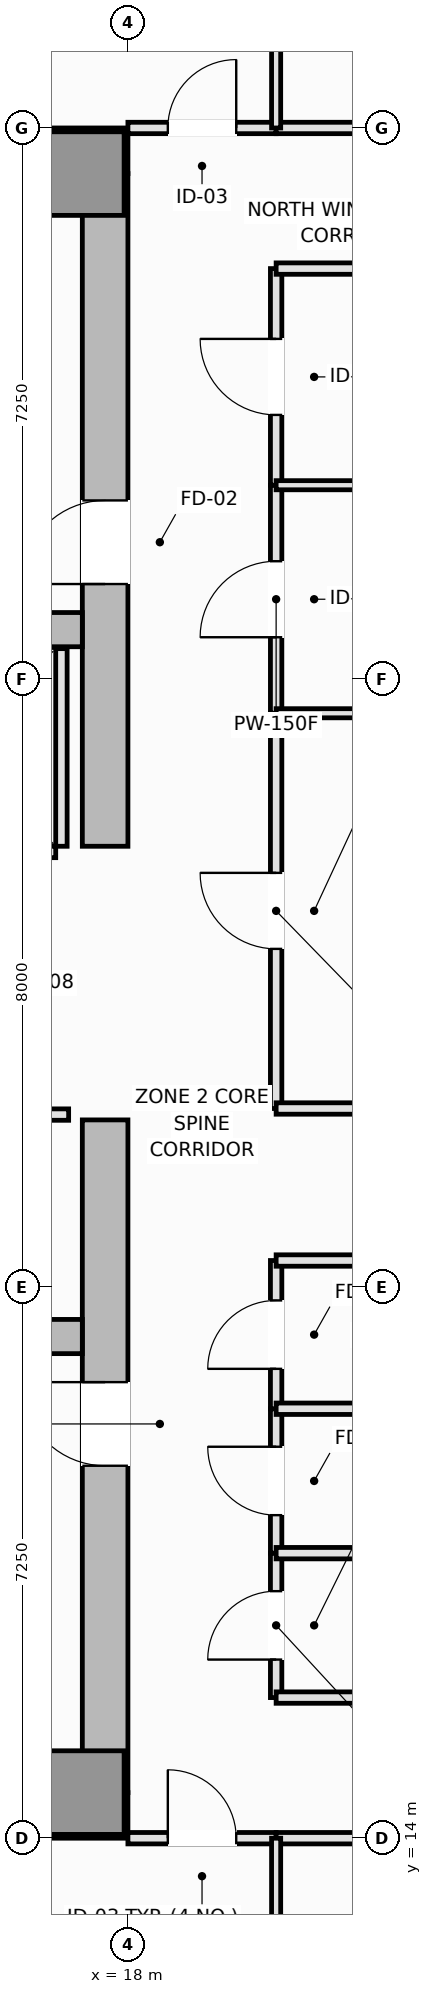
"""IFC4 building model, lengths in metres.
Left out: names, types, materials, properties, quantities, classifications, styles, units other than length and angle.
Written with IfcOpenShell. Run it as: python <this file> out.ifc"""

import sys

from ifc_helpers import new_model, si_unit, direction, frame, frame_2d, origin, origin_2d, place, context, subcontext, project, spatial, rectangle, extrude, element, fill, save


model = new_model("IFC4")
c1 = context("Model", 3, precision=1e-05, world=origin(), true_north=direction((0.0, 1.0)))
c2 = subcontext(c1, "Body", "Model", "MODEL_VIEW")
j1 = project(units=[si_unit("LENGTHUNIT", "METRE"), si_unit("PLANEANGLEUNIT", "RADIAN")], contexts=[c1])
p1 = place(None, origin())
s1 = spatial("IfcSite", under=j1, at=p1, CompositionType="ELEMENT")
p2 = place(p1, origin())
s2 = spatial("IfcBuilding", under=s1, at=p2, CompositionType="ELEMENT")
p3 = place(p2, frame((0.0, 0.0, 166.15)))
s3 = spatial("IfcBuildingStorey", under=s2, at=p3, CompositionType="ELEMENT", Elevation=166.15)
for number, where, z_axis, x_axis in (
    (1, (4.5, 14.3, 0.0), (0.0, 0.0, 1.0), (1.0, 0.0, 0.0)),
    (2, (4.5, 36.2, 0.0), (0.0, 0.0, 1.0), (1.0, 0.0, 0.0)),
):
    element("IfcWall", number, at=place(p3, frame(where, z_axis=z_axis, x_axis=x_axis)), inside=s3, PredefinedType="SHEAR", context=c2, shape_type="SweptSolid", body=[
        extrude(rectangle(XDim=13.5, YDim=0.6, at=frame_2d((6.75, 0.0))), origin(), (0.0, 0.0, 1.0), 3.55),
    ])
p4 = place(p3, frame((17.7, 14.6, 0.0), z_axis=(0.0, 0.0, 1.0), x_axis=(0.0, 1.0, 0.0)))
e3 = element("IfcWall", 3, at=p4, inside=s3, PredefinedType="SHEAR", context=c2, shape_type="SweptSolid", body=[
    extrude(rectangle(XDim=8.85, YDim=0.6, at=frame_2d((4.425, 0.0))), origin(), (0.0, 0.0, 1.0), 3.55),
])
p5 = place(p4, frame((4.3, 0.0, 0.0)))
e4 = element("IfcOpeningElement", 4, at=p5, cuts=e3, PredefinedType="OPENING", context=c2, shape_type="SweptSolid", body=[
    extrude(rectangle(XDim=1.1, YDim=2.15, at=frame_2d((0.55, 1.075))), frame((0.0, 0.31, 0.0), z_axis=(0.0, -1.0, 0.0), x_axis=(1.0, 0.0, 0.0)), (0.0, 0.0, 1.0), 0.62),
])
p6 = place(p3, frame((17.7, 27.05, 0.0), z_axis=(0.0, 0.0, 1.0), x_axis=(0.0, 1.0, 0.0)))
e5 = element("IfcWall", 5, at=p6, inside=s3, PredefinedType="SHEAR", context=c2, shape_type="SweptSolid", body=[
    extrude(rectangle(XDim=8.85, YDim=0.6, at=frame_2d((4.425, 0.0))), origin(), (0.0, 0.0, 1.0), 3.55),
])
p7 = place(p6, frame((3.45, 0.0, 0.0)))
e6 = element("IfcOpeningElement", 6, at=p7, cuts=e5, PredefinedType="OPENING", context=c2, shape_type="SweptSolid", body=[
    extrude(rectangle(XDim=1.1, YDim=2.15, at=frame_2d((0.55, 1.075))), frame((0.0, 0.31, 0.0), z_axis=(0.0, -1.0, 0.0), x_axis=(1.0, 0.0, 0.0)), (0.0, 0.0, 1.0), 0.62),
])
for number, where, z_axis, x_axis in (
    (7, (5.1, 20.6, 0.0), (0.0, 0.0, 1.0), (1.0, 0.0, 0.0)),
    (8, (5.1, 29.9, 0.0), (0.0, 0.0, 1.0), (1.0, 0.0, 0.0)),
):
    element("IfcWall", number, at=place(p3, frame(where, z_axis=z_axis, x_axis=x_axis)), inside=s3, PredefinedType="SHEAR", context=c2, shape_type="SweptSolid", body=[
        extrude(rectangle(XDim=12.3, YDim=0.45, at=frame_2d((6.15, 0.0))), origin(), (0.0, 0.0, 1.0), 3.55),
    ])
for number, where, z_axis, x_axis in (
    (9, (17.4, 14.6, 0.0), (0.0, 0.0, 1.0), (1.0, 0.0, 0.0)),
    (10, (17.4, 35.9, 0.0), (0.0, 0.0, 1.0), (1.0, 0.0, 0.0)),
):
    element("IfcColumn", number, at=place(p3, frame(where, z_axis=z_axis, x_axis=x_axis)), inside=s3, PredefinedType="PILASTER", context=c2, shape_type="SweptSolid", body=[
        extrude(rectangle(XDim=1.1, YDim=1.1, at=origin_2d()), origin(), (0.0, 0.0, 1.0), 3.55),
    ])
p8 = place(p3, frame((14.5, 26.975, 0.0), z_axis=(0.0, 0.0, 1.0), x_axis=(1.0, 0.0, 0.0)))
e11 = element("IfcWall", 11, at=p8, inside=s3, PredefinedType="PARTITIONING", context=c2, shape_type="SweptSolid", body=[
    extrude(rectangle(XDim=2.55, YDim=0.15, at=frame_2d((1.275, 0.0))), origin(), (0.0, 0.0, 1.0), 3.37),
])
p9 = place(p8, frame((0.625, 0.0, 0.0)))
e12 = element("IfcOpeningElement", 12, at=p9, cuts=e11, PredefinedType="OPENING", context=c2, shape_type="SweptSolid", body=[
    extrude(rectangle(XDim=1.3, YDim=2.2, at=frame_2d((0.65, 1.1))), frame((0.0, 0.085, 0.0), z_axis=(0.0, -1.0, 0.0), x_axis=(1.0, 0.0, 0.0)), (0.0, 0.0, 1.0), 0.17),
])
p10 = place(p3, frame((17.125, 27.05, 0.0), z_axis=(0.0, 0.0, 1.0), x_axis=(0.0, 1.0, 0.0)))
e13 = element("IfcWall", 13, at=p10, inside=s3, PredefinedType="PARTITIONING", context=c2, shape_type="SweptSolid", body=[
    extrude(rectangle(XDim=2.6, YDim=0.15, at=frame_2d((1.3, 0.0))), origin(), (0.0, 0.0, 1.0), 3.37),
])
p11 = place(p3, frame((16.05, 23.52, 0.0), z_axis=(0.0, 0.0, 1.0), x_axis=(1.0, 0.0, 0.0)))
e14 = element("IfcWall", 14, at=p11, inside=s3, PredefinedType="PARTITIONING", context=c2, shape_type="SweptSolid", body=[
    extrude(rectangle(XDim=1.17, YDim=0.15, at=frame_2d((0.585, 0.0))), origin(), (0.0, 0.0, 1.0), 3.37),
])
p12 = place(p3, frame((19.95, 15.85, 0.0), z_axis=(0.0, 0.0, 1.0), x_axis=(0.0, 1.0, 0.0)))
e15 = element("IfcWall", 15, at=p12, inside=s3, PredefinedType="PLUMBINGWALL", context=c2, shape_type="SweptSolid", body=[
    extrude(rectangle(XDim=1.9, YDim=0.15, at=frame_2d((0.95, 0.0))), origin(), (0.0, 0.0, 1.0), 3.37),
])
p13 = place(p12, frame((0.5, 0.0, 0.0)))
e16 = element("IfcOpeningElement", 16, at=p13, cuts=e15, PredefinedType="OPENING", context=c2, shape_type="SweptSolid", body=[
    extrude(rectangle(XDim=0.9, YDim=2.1, at=frame_2d((0.45, 1.05))), frame((0.0, 0.085, 0.0), z_axis=(0.0, -1.0, 0.0), x_axis=(1.0, 0.0, 0.0)), (0.0, 0.0, 1.0), 0.17),
])
p14 = place(p3, frame((19.95, 17.75, 0.0), z_axis=(0.0, 0.0, 1.0), x_axis=(0.0, 1.0, 0.0)))
e17 = element("IfcWall", 17, at=p14, inside=s3, PredefinedType="PLUMBINGWALL", context=c2, shape_type="SweptSolid", body=[
    extrude(rectangle(XDim=1.9, YDim=0.15, at=frame_2d((0.95, 0.0))), origin(), (0.0, 0.0, 1.0), 3.37),
])
p15 = place(p14, frame((0.5, 0.0, 0.0)))
e18 = element("IfcOpeningElement", 18, at=p15, cuts=e17, PredefinedType="OPENING", context=c2, shape_type="SweptSolid", body=[
    extrude(rectangle(XDim=0.9, YDim=2.1, at=frame_2d((0.45, 1.05))), frame((0.0, 0.085, 0.0), z_axis=(0.0, -1.0, 0.0), x_axis=(1.0, 0.0, 0.0)), (0.0, 0.0, 1.0), 0.17),
])
p16 = place(p3, frame((19.95, 19.65, 0.0), z_axis=(0.0, 0.0, 1.0), x_axis=(0.0, 1.0, 0.0)))
e19 = element("IfcWall", 19, at=p16, inside=s3, PredefinedType="PLUMBINGWALL", context=c2, shape_type="SweptSolid", body=[
    extrude(rectangle(XDim=1.95, YDim=0.15, at=frame_2d((0.975, 0.0))), origin(), (0.0, 0.0, 1.0), 3.37),
])
p17 = place(p16, frame((0.525, 0.0, 0.0)))
e20 = element("IfcOpeningElement", 20, at=p17, cuts=e19, PredefinedType="OPENING", context=c2, shape_type="SweptSolid", body=[
    extrude(rectangle(XDim=0.9, YDim=2.1, at=frame_2d((0.45, 1.05))), frame((0.0, 0.085, 0.0), z_axis=(0.0, -1.0, 0.0), x_axis=(1.0, 0.0, 0.0)), (0.0, 0.0, 1.0), 0.17),
])
p18 = place(p3, frame((19.95, 23.6, 0.0), z_axis=(0.0, 0.0, 1.0), x_axis=(0.0, 1.0, 0.0)))
e21 = element("IfcWall", 21, at=p18, inside=s3, PredefinedType="PARTITIONING", context=c2, shape_type="SweptSolid", body=[
    extrude(rectangle(XDim=5.2, YDim=0.15, at=frame_2d((2.6, 0.0))), origin(), (0.0, 0.0, 1.0), 3.37),
])
p19 = place(p18, frame((2.1, 0.0, 0.0)))
e22 = element("IfcOpeningElement", 22, at=p19, cuts=e21, PredefinedType="OPENING", context=c2, shape_type="SweptSolid", body=[
    extrude(rectangle(XDim=1.0, YDim=2.15, at=frame_2d((0.5, 1.075))), frame((0.0, 0.085, 0.0), z_axis=(0.0, -1.0, 0.0), x_axis=(1.0, 0.0, 0.0)), (0.0, 0.0, 1.0), 0.17),
])
p20 = place(p3, frame((19.95, 28.8, 0.0), z_axis=(0.0, 0.0, 1.0), x_axis=(0.0, 1.0, 0.0)))
e23 = element("IfcWall", 23, at=p20, inside=s3, PredefinedType="PARTITIONING", context=c2, shape_type="SweptSolid", body=[
    extrude(rectangle(XDim=3.0, YDim=0.15, at=frame_2d((1.5, 0.0))), origin(), (0.0, 0.0, 1.0), 3.37),
])
p21 = place(p20, frame((1.0, 0.0, 0.0)))
e24 = element("IfcOpeningElement", 24, at=p21, cuts=e23, PredefinedType="OPENING", context=c2, shape_type="SweptSolid", body=[
    extrude(rectangle(XDim=1.0, YDim=2.15, at=frame_2d((0.5, 1.075))), frame((0.0, 0.085, 0.0), z_axis=(0.0, -1.0, 0.0), x_axis=(1.0, 0.0, 0.0)), (0.0, 0.0, 1.0), 0.17),
])
p22 = place(p3, frame((19.95, 31.8, 0.0), z_axis=(0.0, 0.0, 1.0), x_axis=(0.0, 1.0, 0.0)))
e25 = element("IfcWall", 25, at=p22, inside=s3, PredefinedType="PARTITIONING", context=c2, shape_type="SweptSolid", body=[
    extrude(rectangle(XDim=2.85, YDim=0.15, at=frame_2d((1.425, 0.0))), origin(), (0.0, 0.0, 1.0), 3.37),
])
p23 = place(p22, frame((0.925, 0.0, 0.0)))
e26 = element("IfcOpeningElement", 26, at=p23, cuts=e25, PredefinedType="OPENING", context=c2, shape_type="SweptSolid", body=[
    extrude(rectangle(XDim=1.0, YDim=2.15, at=frame_2d((0.5, 1.075))), frame((0.0, 0.085, 0.0), z_axis=(0.0, -1.0, 0.0), x_axis=(1.0, 0.0, 0.0)), (0.0, 0.0, 1.0), 0.17),
])
p24 = place(p3, frame((18.0, 14.0, 0.0), z_axis=(0.0, 0.0, 1.0), x_axis=(1.0, 0.0, 0.0)))
e27 = element("IfcWall", 27, at=p24, inside=s3, PredefinedType="PARTITIONING", context=c2, shape_type="SweptSolid", body=[
    extrude(rectangle(XDim=1.95, YDim=0.15, at=frame_2d((0.975, 0.0))), origin(), (0.0, 0.0, 1.0), 3.37),
])
p25 = place(p24, frame((0.525, 0.0, 0.0)))
e28 = element("IfcOpeningElement", 28, at=p25, cuts=e27, PredefinedType="OPENING", context=c2, shape_type="SweptSolid", body=[
    extrude(rectangle(XDim=0.9, YDim=2.1, at=frame_2d((0.45, 1.05))), frame((0.0, 0.085, 0.0), z_axis=(0.0, -1.0, 0.0), x_axis=(1.0, 0.0, 0.0)), (0.0, 0.0, 1.0), 0.17),
])
p26 = place(p3, frame((18.0, 36.5, 0.0), z_axis=(0.0, 0.0, 1.0), x_axis=(1.0, 0.0, 0.0)))
e29 = element("IfcWall", 29, at=p26, inside=s3, PredefinedType="PARTITIONING", context=c2, shape_type="SweptSolid", body=[
    extrude(rectangle(XDim=1.95, YDim=0.15, at=frame_2d((0.975, 0.0))), origin(), (0.0, 0.0, 1.0), 3.37),
])
p27 = place(p26, frame((0.525, 0.0, 0.0)))
e30 = element("IfcOpeningElement", 30, at=p27, cuts=e29, PredefinedType="OPENING", context=c2, shape_type="SweptSolid", body=[
    extrude(rectangle(XDim=0.9, YDim=2.1, at=frame_2d((0.45, 1.05))), frame((0.0, 0.085, 0.0), z_axis=(0.0, -1.0, 0.0), x_axis=(1.0, 0.0, 0.0)), (0.0, 0.0, 1.0), 0.17),
])
p28 = place(p3, frame((19.95, 21.6, 0.0), z_axis=(0.0, 0.0, 1.0), x_axis=(1.0, 0.0, 0.0)))
e31 = element("IfcWall", 31, at=p28, inside=s3, PredefinedType="PLUMBINGWALL", context=c2, shape_type="SweptSolid", body=[
    extrude(rectangle(XDim=3.65, YDim=0.15, at=frame_2d((1.825, 0.0))), origin(), (0.0, 0.0, 1.0), 3.37),
])
p29 = place(p3, frame((19.95, 23.6, 0.0), z_axis=(0.0, 0.0, 1.0), x_axis=(1.0, 0.0, 0.0)))
e32 = element("IfcWall", 32, at=p29, inside=s3, PredefinedType="PARTITIONING", context=c2, shape_type="SweptSolid", body=[
    extrude(rectangle(XDim=7.55, YDim=0.15, at=frame_2d((3.775, 0.0))), origin(), (0.0, 0.0, 1.0), 3.37),
])
p30 = place(p3, frame((19.95, 15.85, 0.0), z_axis=(0.0, 0.0, 1.0), x_axis=(1.0, 0.0, 0.0)))
e33 = element("IfcWall", 33, at=p30, inside=s3, PredefinedType="PLUMBINGWALL", context=c2, shape_type="SweptSolid", body=[
    extrude(rectangle(XDim=3.65, YDim=0.15, at=frame_2d((1.825, 0.0))), origin(), (0.0, 0.0, 1.0), 3.37),
])
p31 = place(p3, frame((19.95, 14.0, 0.0), z_axis=(0.0, 0.0, 1.0), x_axis=(1.0, 0.0, 0.0)))
e34 = element("IfcWall", 34, at=p31, inside=s3, PredefinedType="PARTITIONING", context=c2, shape_type="SweptSolid", body=[
    extrude(rectangle(XDim=7.55, YDim=0.15, at=frame_2d((3.775, 0.0))), origin(), (0.0, 0.0, 1.0), 3.37),
])
p32 = place(p31, frame((3.275, 0.0, 0.0)))
e35 = element("IfcOpeningElement", 35, at=p32, cuts=e34, PredefinedType="OPENING", context=c2, shape_type="SweptSolid", body=[
    extrude(rectangle(XDim=1.0, YDim=2.15, at=frame_2d((0.5, 1.075))), frame((0.0, 0.085, 0.0), z_axis=(0.0, -1.0, 0.0), x_axis=(1.0, 0.0, 0.0)), (0.0, 0.0, 1.0), 0.17),
])
p33 = place(p3, frame((19.95, 34.65, 0.0), z_axis=(0.0, 0.0, 1.0), x_axis=(1.0, 0.0, 0.0)))
e36 = element("IfcWall", 36, at=p33, inside=s3, PredefinedType="PARTITIONING", context=c2, shape_type="SweptSolid", body=[
    extrude(rectangle(XDim=7.55, YDim=0.15, at=frame_2d((3.775, 0.0))), origin(), (0.0, 0.0, 1.0), 3.37),
])
p34 = place(p3, frame((19.95, 36.5, 0.0), z_axis=(0.0, 0.0, 1.0), x_axis=(1.0, 0.0, 0.0)))
e37 = element("IfcWall", 37, at=p34, inside=s3, PredefinedType="PARTITIONING", context=c2, shape_type="SweptSolid", body=[
    extrude(rectangle(XDim=7.55, YDim=0.15, at=frame_2d((3.775, 0.0))), origin(), (0.0, 0.0, 1.0), 3.37),
])
p35 = place(p34, frame((3.275, 0.0, 0.0)))
e38 = element("IfcOpeningElement", 38, at=p35, cuts=e37, PredefinedType="OPENING", context=c2, shape_type="SweptSolid", body=[
    extrude(rectangle(XDim=1.0, YDim=2.15, at=frame_2d((0.5, 1.075))), frame((0.0, 0.085, 0.0), z_axis=(0.0, -1.0, 0.0), x_axis=(1.0, 0.0, 0.0)), (0.0, 0.0, 1.0), 0.17),
])
for number, where, z_axis, x_axis in (
    (39, (19.95, 17.75, 0.0), (0.0, 0.0, 1.0), (1.0, 0.0, 0.0)),
    (40, (19.95, 19.65, 0.0), (0.0, 0.0, 1.0), (1.0, 0.0, 0.0)),
):
    element("IfcWall", number, at=place(p3, frame(where, z_axis=z_axis, x_axis=x_axis)), inside=s3, PredefinedType="PLUMBINGWALL", context=c2, shape_type="SweptSolid", body=[
        extrude(rectangle(XDim=3.65, YDim=0.15, at=frame_2d((1.825, 0.0))), origin(), (0.0, 0.0, 1.0), 3.37),
    ])
for number, where, z_axis, x_axis in (
    (41, (19.95, 28.8, 0.0), (0.0, 0.0, 1.0), (1.0, 0.0, 0.0)),
    (42, (19.95, 31.8, 0.0), (0.0, 0.0, 1.0), (1.0, 0.0, 0.0)),
):
    element("IfcWall", number, at=place(p3, frame(where, z_axis=z_axis, x_axis=x_axis)), inside=s3, PredefinedType="PARTITIONING", context=c2, shape_type="SweptSolid", body=[
        extrude(rectangle(XDim=7.55, YDim=0.12, at=frame_2d((3.775, 0.0))), origin(), (0.0, 0.0, 1.0), 3.37),
    ])
p36 = place(p3, frame((19.95, 3.51, 0.0), z_axis=(0.0, 0.0, 1.0), x_axis=(0.0, 1.0, 0.0)))
e43 = element("IfcWall", 43, at=p36, inside=s3, PredefinedType="PARTITIONING", context=c2, shape_type="SweptSolid", body=[
    extrude(rectangle(XDim=10.49, YDim=0.12, at=frame_2d((5.245, 0.0))), origin(), (0.0, 0.0, 1.0), 3.37),
])
p37 = place(p3, frame((19.95, 36.5, 0.0), z_axis=(0.0, 0.0, 1.0), x_axis=(0.0, 1.0, 0.0)))
e44 = element("IfcWall", 44, at=p37, inside=s3, PredefinedType="PARTITIONING", context=c2, shape_type="SweptSolid", body=[
    extrude(rectangle(XDim=9.99, YDim=0.12, at=frame_2d((4.995, 0.0))), origin(), (0.0, 0.0, 1.0), 3.37),
])
p38 = place(p5, origin())
e45 = element("IfcDoor", 45, at=p38, inside=s3, OperationType="SINGLE_SWING_RIGHT", PredefinedType="DOOR", context=c2, shape_type="SweptSolid", body=[
    extrude(rectangle(XDim=1.1, YDim=2.15, at=frame_2d((0.55, 1.075))), frame((0.0, 0.025, 0.0), z_axis=(0.0, -1.0, 0.0), x_axis=(1.0, 0.0, 0.0)), (0.0, 0.0, 1.0), 0.05),
])
fill(e4, e45)
p39 = place(p7, origin())
e46 = element("IfcDoor", 46, at=p39, inside=s3, OperationType="SINGLE_SWING_LEFT", PredefinedType="DOOR", context=c2, shape_type="SweptSolid", body=[
    extrude(rectangle(XDim=1.1, YDim=2.15, at=frame_2d((0.55, 1.075))), frame((0.0, 0.025, 0.0), z_axis=(0.0, -1.0, 0.0), x_axis=(1.0, 0.0, 0.0)), (0.0, 0.0, 1.0), 0.05),
])
fill(e6, e46)
p40 = place(p13, origin())
e47 = element("IfcDoor", 47, at=p40, inside=s3, OperationType="SINGLE_SWING_LEFT", PredefinedType="DOOR", context=c2, shape_type="SweptSolid", body=[
    extrude(rectangle(XDim=0.9, YDim=2.1, at=frame_2d((0.45, 1.05))), frame((0.0, 0.025, 0.0), z_axis=(0.0, -1.0, 0.0), x_axis=(1.0, 0.0, 0.0)), (0.0, 0.0, 1.0), 0.05),
])
fill(e16, e47)
p41 = place(p15, origin())
e48 = element("IfcDoor", 48, at=p41, inside=s3, OperationType="SINGLE_SWING_RIGHT", PredefinedType="DOOR", context=c2, shape_type="SweptSolid", body=[
    extrude(rectangle(XDim=0.9, YDim=2.1, at=frame_2d((0.45, 1.05))), frame((0.0, 0.025, 0.0), z_axis=(0.0, -1.0, 0.0), x_axis=(1.0, 0.0, 0.0)), (0.0, 0.0, 1.0), 0.05),
])
fill(e18, e48)
p42 = place(p17, origin())
e49 = element("IfcDoor", 49, at=p42, inside=s3, OperationType="SINGLE_SWING_LEFT", PredefinedType="DOOR", context=c2, shape_type="SweptSolid", body=[
    extrude(rectangle(XDim=0.9, YDim=2.1, at=frame_2d((0.45, 1.05))), frame((0.0, 0.025, 0.0), z_axis=(0.0, -1.0, 0.0), x_axis=(1.0, 0.0, 0.0)), (0.0, 0.0, 1.0), 0.05),
])
fill(e20, e49)
p43 = place(p19, origin())
e50 = element("IfcDoor", 50, at=p43, inside=s3, OperationType="SINGLE_SWING_RIGHT", PredefinedType="DOOR", context=c2, shape_type="SweptSolid", body=[
    extrude(rectangle(XDim=1.0, YDim=2.15, at=frame_2d((0.5, 1.075))), frame((0.0, 0.025, 0.0), z_axis=(0.0, -1.0, 0.0), x_axis=(1.0, 0.0, 0.0)), (0.0, 0.0, 1.0), 0.05),
])
fill(e22, e50)
p44 = place(p21, origin())
e51 = element("IfcDoor", 51, at=p44, inside=s3, OperationType="SINGLE_SWING_LEFT", PredefinedType="DOOR", context=c2, shape_type="SweptSolid", body=[
    extrude(rectangle(XDim=1.0, YDim=2.15, at=frame_2d((0.5, 1.075))), frame((0.0, 0.025, 0.0), z_axis=(0.0, -1.0, 0.0), x_axis=(1.0, 0.0, 0.0)), (0.0, 0.0, 1.0), 0.05),
])
fill(e24, e51)
p45 = place(p23, origin())
e52 = element("IfcDoor", 52, at=p45, inside=s3, OperationType="SINGLE_SWING_RIGHT", PredefinedType="DOOR", context=c2, shape_type="SweptSolid", body=[
    extrude(rectangle(XDim=1.0, YDim=2.15, at=frame_2d((0.5, 1.075))), frame((0.0, 0.025, 0.0), z_axis=(0.0, -1.0, 0.0), x_axis=(1.0, 0.0, 0.0)), (0.0, 0.0, 1.0), 0.05),
])
fill(e26, e52)
p46 = place(p25, origin())
e53 = element("IfcDoor", 53, at=p46, inside=s3, OperationType="SINGLE_SWING_LEFT", PredefinedType="DOOR", context=c2, shape_type="SweptSolid", body=[
    extrude(rectangle(XDim=0.9, YDim=2.1, at=frame_2d((0.45, 1.05))), frame((0.0, 0.025, 0.0), z_axis=(0.0, -1.0, 0.0), x_axis=(1.0, 0.0, 0.0)), (0.0, 0.0, 1.0), 0.05),
])
fill(e28, e53)
p47 = place(p27, origin())
e54 = element("IfcDoor", 54, at=p47, inside=s3, OperationType="SINGLE_SWING_RIGHT", PredefinedType="DOOR", context=c2, shape_type="SweptSolid", body=[
    extrude(rectangle(XDim=0.9, YDim=2.1, at=frame_2d((0.45, 1.05))), frame((0.0, 0.025, 0.0), z_axis=(0.0, -1.0, 0.0), x_axis=(1.0, 0.0, 0.0)), (0.0, 0.0, 1.0), 0.05),
])
fill(e30, e54)
save(model, sys.argv[1])
